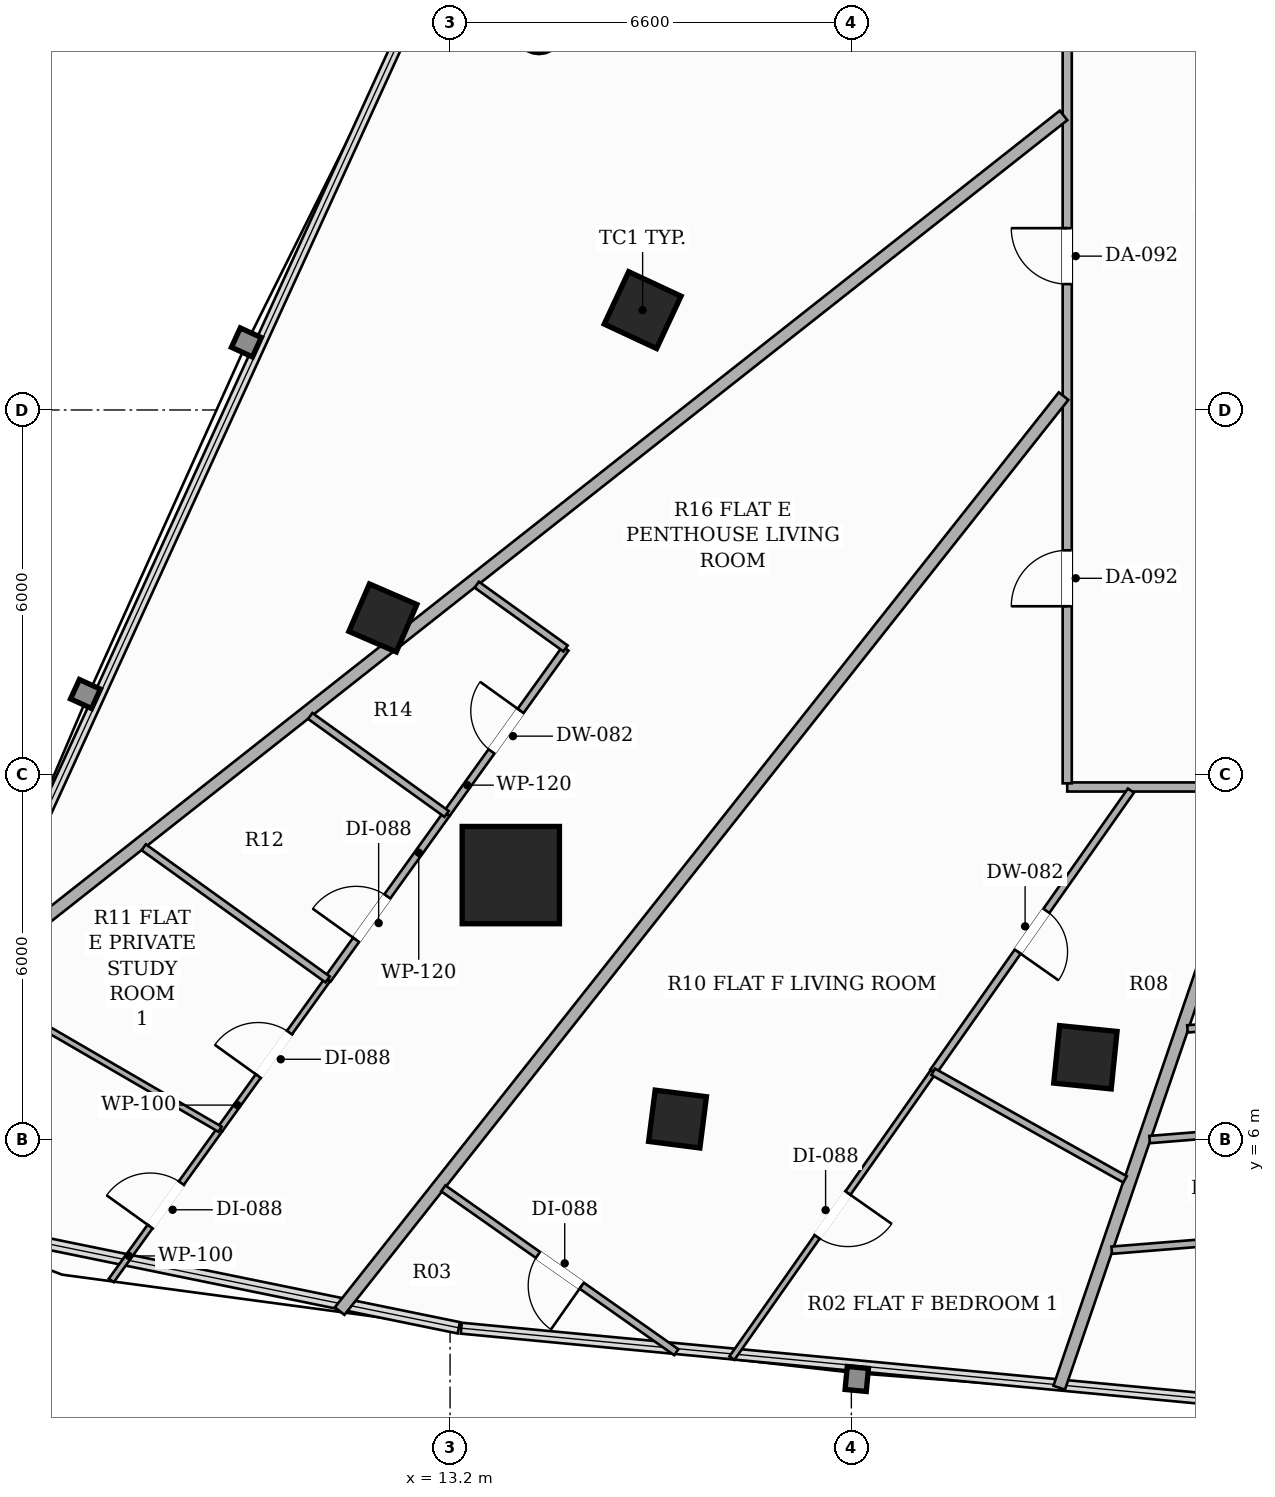
"""IFC4 building model, lengths in metres.
Left out: names, types, materials, properties, quantities, classifications, styles, units other than length and angle.
Written with IfcOpenShell. Run it as: python <this file> out.ifc"""

import sys

from ifc_helpers import new_model, si_unit, direction, frame, frame_2d, origin, origin_2d, place, context, subcontext, project, spatial, rectangle, hollow_rectangle, hollow_circle, extrude, element, fill, save


model = new_model("IFC4")
c1 = context("Model", 3, precision=1e-05, world=origin(), true_north=direction((0.0, 1.0)))
c2 = subcontext(c1, "Body", "Model", "MODEL_VIEW")
j1 = project(units=[si_unit("LENGTHUNIT", "METRE"), si_unit("PLANEANGLEUNIT", "RADIAN")], contexts=[c1])
p1 = place(None, origin())
s1 = spatial("IfcSite", under=j1, at=p1, CompositionType="ELEMENT")
p2 = place(p1, origin())
s2 = spatial("IfcBuilding", under=s1, at=p2, CompositionType="ELEMENT")
p3 = place(p2, frame((0.0, 0.0, 53.3)))
s3 = spatial("IfcBuildingStorey", under=s2, at=p3, CompositionType="ELEMENT", Elevation=53.3)
p4 = place(p3, frame((14.199, 10.351, 0.0), z_axis=(0.0, 0.0, 1.0), x_axis=(1.0, 0.0, 0.0)))
e1 = element("IfcColumn", 1, at=p4, inside=s3, PredefinedType="COLUMN", context=c2, shape_type="SweptSolid", body=[
    extrude(hollow_rectangle(XDim=1.6, YDim=1.6, WallThickness=0.05, at=origin_2d()), origin(), (0.0, 0.0, 1.0), 3.3),
])
for number, where, z_axis, x_axis in (
    (2, (16.367, 19.642, 0.0), (0.0, 0.0, 1.0), (0.423, 0.906, 0.0)),
    (3, (23.649, 7.355, 0.0), (0.0, 0.0, 1.0), (-0.995, 0.101, 0.0)),
):
    element("IfcColumn", number, at=place(p3, frame(where, z_axis=z_axis, x_axis=x_axis)), inside=s3, PredefinedType="COLUMN", context=c2, shape_type="SweptSolid", body=[
        extrude(hollow_rectangle(XDim=0.95, YDim=0.95, WallThickness=0.032, at=origin_2d()), origin(), (0.0, 0.0, 1.0), 3.3),
    ])
for number, where, z_axis, x_axis in (
    (4, (12.095, 14.58, 0.0), (0.0, 0.0, 1.0), (0.397, 0.918, 0.0)),
    (5, (16.941, 6.339, 0.0), (0.0, 0.0, 1.0), (-0.992, 0.127, 0.0)),
):
    element("IfcColumn", number, at=place(p3, frame(where, z_axis=z_axis, x_axis=x_axis)), inside=s3, PredefinedType="COLUMN", context=c2, shape_type="SweptSolid", body=[
        extrude(hollow_rectangle(XDim=0.85, YDim=0.85, WallThickness=0.028, at=origin_2d()), origin(), (0.0, 0.0, 1.0), 3.3),
    ])
p5 = place(p3, frame((14.662, 24.256, 0.0), z_axis=(0.0, 0.0, 1.0), x_axis=(1.0, 0.0, 0.0)))
e6 = element("IfcColumn", 6, at=p5, inside=s3, PredefinedType="COLUMN", context=c2, shape_type="SweptSolid", body=[
    extrude(hollow_circle(Radius=0.381, WallThickness=0.022, at=origin_2d()), origin(), (0.0, 0.0, 1.0), 3.3),
])
p6 = place(p3, frame((42.59, 11.8, 0.0), z_axis=(0.0, 0.0, 1.0), x_axis=(-1.0, 0.0, 0.0)))
e7 = element("IfcWall", 7, at=p6, inside=s3, PredefinedType="PARTITIONING", context=c2, shape_type="SweptSolid", body=[
    extrude(rectangle(XDim=19.24, YDim=0.15, at=frame_2d((9.62, 0.0))), origin(), (0.0, 0.0, 1.0), 2.669),
])
p7 = place(p6, frame((11.355, 0.0, 0.0)))
e8 = element("IfcOpeningElement", 8, at=p7, cuts=e7, PredefinedType="OPENING", context=c2, shape_type="SweptSolid", body=[
    extrude(rectangle(XDim=0.92, YDim=2.15, at=frame_2d((0.46, 1.075))), frame((0.0, 0.085, 0.0), z_axis=(0.0, -1.0, 0.0), x_axis=(1.0, 0.0, 0.0)), (0.0, 0.0, 1.0), 0.17),
])
p8 = place(p6, frame((3.524, 0.0, 0.0)))
e9 = element("IfcOpeningElement", 9, at=p8, cuts=e7, PredefinedType="OPENING", context=c2, shape_type="SweptSolid", body=[
    extrude(rectangle(XDim=0.88, YDim=2.1, at=frame_2d((0.44, 1.05))), frame((0.0, 0.085, 0.0), z_axis=(0.0, -1.0, 0.0), x_axis=(1.0, 0.0, 0.0)), (0.0, 0.0, 1.0), 0.17),
])
p9 = place(p3, frame((23.35, 11.86, 0.0), z_axis=(0.0, 0.0, 1.0), x_axis=(0.0, 1.0, 0.0)))
e10 = element("IfcWall", 10, at=p9, inside=s3, PredefinedType="PARTITIONING", context=c2, shape_type="SweptSolid", body=[
    extrude(rectangle(XDim=25.04, YDim=0.15, at=frame_2d((12.52, 0.0))), origin(), (0.0, 0.0, 1.0), 2.413),
])
p10 = place(p9, frame((15.434, 0.0, 0.0)))
e11 = element("IfcOpeningElement", 11, at=p10, cuts=e10, PredefinedType="OPENING", context=c2, shape_type="SweptSolid", body=[
    extrude(rectangle(XDim=0.88, YDim=2.1, at=frame_2d((0.44, 1.05))), frame((0.0, 0.085, 0.0), z_axis=(0.0, -1.0, 0.0), x_axis=(1.0, 0.0, 0.0)), (0.0, 0.0, 1.0), 0.17),
])
p11 = place(p9, frame((22.315, 0.0, 0.0)))
e12 = element("IfcOpeningElement", 12, at=p11, cuts=e10, PredefinedType="OPENING", context=c2, shape_type="SweptSolid", body=[
    extrude(rectangle(XDim=0.88, YDim=2.1, at=frame_2d((0.44, 1.05))), frame((0.0, 0.085, 0.0), z_axis=(0.0, -1.0, 0.0), x_axis=(1.0, 0.0, 0.0)), (0.0, 0.0, 1.0), 0.17),
])
p12 = place(p9, frame((8.21, 0.0, 0.0)))
e13 = element("IfcOpeningElement", 13, at=p12, cuts=e10, PredefinedType="OPENING", context=c2, shape_type="SweptSolid", body=[
    extrude(rectangle(XDim=0.92, YDim=2.15, at=frame_2d((0.46, 1.075))), frame((0.0, 0.085, 0.0), z_axis=(0.0, -1.0, 0.0), x_axis=(1.0, 0.0, 0.0)), (0.0, 0.0, 1.0), 0.17),
])
p13 = place(p9, frame((2.912, 0.0, 0.0)))
e14 = element("IfcOpeningElement", 14, at=p13, cuts=e10, PredefinedType="OPENING", context=c2, shape_type="SweptSolid", body=[
    extrude(rectangle(XDim=0.92, YDim=2.15, at=frame_2d((0.46, 1.075))), frame((0.0, 0.085, 0.0), z_axis=(0.0, -1.0, 0.0), x_axis=(1.0, 0.0, 0.0)), (0.0, 0.0, 1.0), 0.17),
])
p14 = place(p3, frame((23.29, 22.844, 0.0), z_axis=(0.0, 0.0, 1.0), x_axis=(-0.785302077685, -0.619112790034, 0.0)))
e15 = element("IfcWall", 15, at=p14, inside=s3, PredefinedType="PARTITIONING", context=c2, shape_type="SweptSolid", body=[
    extrude(rectangle(XDim=22.957, YDim=0.2, at=frame_2d((11.479, 0.0))), origin(), (0.0, 0.0, 1.0), 2.413),
])
p15 = place(p3, frame((23.29, 18.228, 0.0), z_axis=(0.0, 0.0, 1.0), x_axis=(-0.620501189922, -0.784205504511, 0.0)))
e16 = element("IfcWall", 16, at=p15, inside=s3, PredefinedType="PARTITIONING", context=c2, shape_type="SweptSolid", body=[
    extrude(rectangle(XDim=19.188, YDim=0.2, at=frame_2d((9.594, 0.0))), origin(), (0.0, 0.0, 1.0), 2.413),
])
p16 = place(p3, frame((26.579, 11.74, 0.0), z_axis=(0.0, 0.0, 1.0), x_axis=(-0.32385337678, -0.946107282684, 0.0)))
e17 = element("IfcWall", 17, at=p16, inside=s3, PredefinedType="PARTITIONING", context=c2, shape_type="SweptSolid", body=[
    extrude(rectangle(XDim=10.378, YDim=0.2, at=frame_2d((5.189, 0.0))), origin(), (0.0, 0.0, 1.0), 2.413),
])
p17 = place(p3, frame((13.143, 11.357, 0.0), z_axis=(0.0, 0.0, 1.0), x_axis=(0.583709603858, 0.811962498127, 0.0)))
e18 = element("IfcWall", 18, at=p17, inside=s3, PredefinedType="PARTITIONING", context=c2, shape_type="SweptSolid", body=[
    extrude(rectangle(XDim=3.351, YDim=0.12, at=frame_2d((1.676, 0.0))), origin(), (0.0, 0.0, 1.0), 2.413),
])
p18 = place(p17, frame((1.266, 0.0, 0.0)))
e19 = element("IfcOpeningElement", 19, at=p18, cuts=e18, PredefinedType="OPENING", context=c2, shape_type="SweptSolid", body=[
    extrude(rectangle(XDim=0.82, YDim=2.1, at=frame_2d((0.41, 1.05))), frame((0.0, 0.07, 0.0), z_axis=(0.0, -1.0, 0.0), x_axis=(1.0, 0.0, 0.0)), (0.0, 0.0, 1.0), 0.14),
])
p19 = place(p3, frame((15.099, 14.078, 0.0), z_axis=(0.0, 0.0, 1.0), x_axis=(-0.812134003072, 0.583470959906, 0.0)))
e20 = element("IfcWall", 20, at=p19, inside=s3, PredefinedType="PARTITIONING", context=c2, shape_type="SweptSolid", body=[
    extrude(rectangle(XDim=1.798, YDim=0.12, at=frame_2d((0.899, 0.0))), origin(), (0.0, 0.0, 1.0), 3.06),
])
p20 = place(p3, frame((11.187, 8.635, 0.0), z_axis=(0.0, 0.0, 1.0), x_axis=(0.583571510595, 0.812061753823, 0.0)))
e21 = element("IfcWall", 21, at=p20, inside=s3, PredefinedType="PARTITIONING", context=c2, shape_type="SweptSolid", body=[
    extrude(rectangle(XDim=3.352, YDim=0.12, at=frame_2d((1.676, 0.0))), origin(), (0.0, 0.0, 1.0), 2.619),
])
p21 = place(p20, frame((0.802, 0.0, 0.0)))
e22 = element("IfcOpeningElement", 22, at=p21, cuts=e21, PredefinedType="OPENING", context=c2, shape_type="SweptSolid", body=[
    extrude(rectangle(XDim=0.88, YDim=2.1, at=frame_2d((0.44, 1.05))), frame((0.0, 0.07, 0.0), z_axis=(0.0, -1.0, 0.0), x_axis=(1.0, 0.0, 0.0)), (0.0, 0.0, 1.0), 0.14),
])
p22 = place(p3, frame((7.629, 3.685, 0.0), z_axis=(0.0, 0.0, 1.0), x_axis=(0.583746077317, 0.811936276574, 0.0)))
e23 = element("IfcWall", 23, at=p22, inside=s3, PredefinedType="PARTITIONING", context=c2, shape_type="SweptSolid", body=[
    extrude(rectangle(XDim=3.063, YDim=0.1, at=frame_2d((1.532, 0.0))), origin(), (0.0, 0.0, 1.0), 3.06),
])
p23 = place(p22, frame((1.092, 0.0, 0.0)))
e24 = element("IfcOpeningElement", 24, at=p23, cuts=e23, PredefinedType="OPENING", context=c2, shape_type="SweptSolid", body=[
    extrude(rectangle(XDim=0.88, YDim=2.1, at=frame_2d((0.44, 1.05))), frame((0.0, 0.06, 0.0), z_axis=(0.0, -1.0, 0.0), x_axis=(1.0, 0.0, 0.0)), (0.0, 0.0, 1.0), 0.12),
])
p24 = place(p3, frame((9.417, 6.172, 0.0), z_axis=(0.0, 0.0, 1.0), x_axis=(0.583596240012, 0.812043981964, 0.0)))
e25 = element("IfcWall", 25, at=p24, inside=s3, PredefinedType="PARTITIONING", context=c2, shape_type="SweptSolid", body=[
    extrude(rectangle(XDim=3.033, YDim=0.1, at=frame_2d((1.517, 0.0))), origin(), (0.0, 0.0, 1.0), 2.619),
])
p25 = place(p24, frame((1.077, 0.0, 0.0)))
e26 = element("IfcOpeningElement", 26, at=p25, cuts=e25, PredefinedType="OPENING", context=c2, shape_type="SweptSolid", body=[
    extrude(rectangle(XDim=0.88, YDim=2.1, at=frame_2d((0.44, 1.05))), frame((0.0, 0.06, 0.0), z_axis=(0.0, -1.0, 0.0), x_axis=(1.0, 0.0, 0.0)), (0.0, 0.0, 1.0), 0.12),
])
p26 = place(p3, frame((13.143, 11.357, 0.0), z_axis=(0.0, 0.0, 1.0), x_axis=(-0.812099176387, 0.583519432162, 0.0)))
e27 = element("IfcWall", 27, at=p26, inside=s3, PredefinedType="PARTITIONING", context=c2, shape_type="SweptSolid", body=[
    extrude(rectangle(XDim=2.761, YDim=0.12, at=frame_2d((1.38, 0.0))), origin(), (0.0, 0.0, 1.0), 3.06),
])
p27 = place(p3, frame((11.187, 8.635, 0.0), z_axis=(0.0, 0.0, 1.0), x_axis=(-0.812025077548, 0.583622543629, 0.0)))
e28 = element("IfcWall", 28, at=p27, inside=s3, PredefinedType="PARTITIONING", context=c2, shape_type="SweptSolid", body=[
    extrude(rectangle(XDim=3.725, YDim=0.12, at=frame_2d((1.863, 0.0))), origin(), (0.0, 0.0, 1.0), 2.619),
])
p28 = place(p3, frame((5.253, 8.59, 0.0), z_axis=(0.0, 0.0, 1.0), x_axis=(0.864777582771, -0.502155087932, 0.0)))
e29 = element("IfcWall", 29, at=p28, inside=s3, PredefinedType="PARTITIONING", context=c2, shape_type="SweptSolid", body=[
    extrude(rectangle(XDim=4.815, YDim=0.1, at=frame_2d((2.408, 0.0))), origin(), (0.0, 0.0, 1.0), 3.06),
])
p29 = place(p3, frame((24.398, 11.74, 0.0), z_axis=(0.0, 0.0, 1.0), x_axis=(-0.575258030062, -0.817972003707, 0.0)))
e30 = element("IfcWall", 30, at=p29, inside=s3, PredefinedType="PARTITIONING", context=c2, shape_type="SweptSolid", body=[
    extrude(rectangle(XDim=5.653, YDim=0.12, at=frame_2d((2.827, 0.0))), origin(), (0.0, 0.0, 1.0), 2.413),
])
p30 = place(p29, frame((2.417, 0.0, 0.0)))
e31 = element("IfcOpeningElement", 31, at=p30, cuts=e30, PredefinedType="OPENING", context=c2, shape_type="SweptSolid", body=[
    extrude(rectangle(XDim=0.82, YDim=2.1, at=frame_2d((0.41, 1.05))), frame((0.0, 0.07, 0.0), z_axis=(0.0, -1.0, 0.0), x_axis=(1.0, 0.0, 0.0)), (0.0, 0.0, 1.0), 0.14),
])
p31 = place(p3, frame((16.921, 2.505, 0.0), z_axis=(0.0, 0.0, 1.0), x_axis=(-0.818042569522, 0.575157677902, 0.0)))
e32 = element("IfcWall", 32, at=p31, inside=s3, PredefinedType="PARTITIONING", context=c2, shape_type="SweptSolid", body=[
    extrude(rectangle(XDim=4.684, YDim=0.12, at=frame_2d((2.342, 0.0))), origin(), (0.0, 0.0, 1.0), 2.619),
])
p32 = place(p31, frame((1.902, 0.0, 0.0)))
e33 = element("IfcOpeningElement", 33, at=p32, cuts=e32, PredefinedType="OPENING", context=c2, shape_type="SweptSolid", body=[
    extrude(rectangle(XDim=0.88, YDim=2.1, at=frame_2d((0.44, 1.05))), frame((0.0, 0.07, 0.0), z_axis=(0.0, -1.0, 0.0), x_axis=(1.0, 0.0, 0.0)), (0.0, 0.0, 1.0), 0.14),
])
p33 = place(p3, frame((21.146, 7.116, 0.0), z_axis=(0.0, 0.0, 1.0), x_axis=(-0.575180299529, -0.818026664011, 0.0)))
e34 = element("IfcWall", 34, at=p33, inside=s3, PredefinedType="PARTITIONING", context=c2, shape_type="SweptSolid", body=[
    extrude(rectangle(XDim=5.757, YDim=0.1, at=frame_2d((2.878, 0.0))), origin(), (0.0, 0.0, 1.0), 2.413),
])
p34 = place(p33, frame((2.438, 0.0, 0.0)))
e35 = element("IfcOpeningElement", 35, at=p34, cuts=e34, PredefinedType="OPENING", context=c2, shape_type="SweptSolid", body=[
    extrude(rectangle(XDim=0.88, YDim=2.1, at=frame_2d((0.44, 1.05))), frame((0.0, 0.06, 0.0), z_axis=(0.0, -1.0, 0.0), x_axis=(1.0, 0.0, 0.0)), (0.0, 0.0, 1.0), 0.12),
])
p35 = place(p3, frame((24.301, 5.347, 0.0), z_axis=(0.0, 0.0, 1.0), x_axis=(-0.872243471816, 0.48907190256, 0.0)))
e36 = element("IfcWall", 36, at=p35, inside=s3, PredefinedType="PARTITIONING", context=c2, shape_type="SweptSolid", body=[
    extrude(rectangle(XDim=3.617, YDim=0.12, at=frame_2d((1.809, 0.0))), origin(), (0.0, 0.0, 1.0), 2.413),
])
p36 = place(p3, frame((27.909, 8.03, 0.0), z_axis=(0.0, 0.0, 1.0), x_axis=(-0.996768339954, -0.080329798112, 0.0)))
e37 = element("IfcWall", 37, at=p36, inside=s3, PredefinedType="PARTITIONING", context=c2, shape_type="SweptSolid", body=[
    extrude(rectangle(XDim=2.589, YDim=0.12, at=frame_2d((1.295, 0.0))), origin(), (0.0, 0.0, 1.0), 3.06),
])
p37 = place(p36, frame((0.885, 0.0, 0.0)))
e38 = element("IfcOpeningElement", 38, at=p37, cuts=e37, PredefinedType="OPENING", context=c2, shape_type="SweptSolid", body=[
    extrude(rectangle(XDim=0.82, YDim=2.1, at=frame_2d((0.41, 1.05))), frame((0.0, 0.07, 0.0), z_axis=(0.0, -1.0, 0.0), x_axis=(1.0, 0.0, 0.0)), (0.0, 0.0, 1.0), 0.14),
])
p38 = place(p3, frame((28.05, 6.272, 0.0), z_axis=(0.0, 0.0, 1.0), x_axis=(-0.99675765278, -0.080462299392, 0.0)))
e39 = element("IfcWall", 39, at=p38, inside=s3, PredefinedType="PARTITIONING", context=c2, shape_type="SweptSolid", body=[
    extrude(rectangle(XDim=3.356, YDim=0.12, at=frame_2d((1.678, 0.0))), origin(), (0.0, 0.0, 1.0), 2.413),
])
p39 = place(p3, frame((28.192, 4.513, 0.0), z_axis=(0.0, 0.0, 1.0), x_axis=(-0.996771449714, -0.080291201486, 0.0)))
e40 = element("IfcWall", 40, at=p39, inside=s3, PredefinedType="PARTITIONING", context=c2, shape_type="SweptSolid", body=[
    extrude(rectangle(XDim=4.123, YDim=0.12, at=frame_2d((2.062, 0.0))), origin(), (0.0, 0.0, 1.0), 2.413),
])
p40 = place(p12, origin())
e41 = element("IfcDoor", 41, at=p40, inside=s3, OperationType="SINGLE_SWING_RIGHT", PredefinedType="DOOR", context=c2, shape_type="SweptSolid", body=[
    extrude(rectangle(XDim=0.92, YDim=2.15, at=frame_2d((0.46, 1.075))), frame((0.0, 0.025, 0.0), z_axis=(0.0, -1.0, 0.0), x_axis=(1.0, 0.0, 0.0)), (0.0, 0.0, 1.0), 0.05),
])
fill(e13, e41)
p41 = place(p18, origin())
e42 = element("IfcDoor", 42, at=p41, inside=s3, OperationType="SINGLE_SWING_RIGHT", PredefinedType="DOOR", context=c2, shape_type="SweptSolid", body=[
    extrude(rectangle(XDim=0.82, YDim=2.1, at=frame_2d((0.41, 1.05))), frame((0.0, 0.025, 0.0), z_axis=(0.0, -1.0, 0.0), x_axis=(1.0, 0.0, 0.0)), (0.0, 0.0, 1.0), 0.05),
])
fill(e19, e42)
p42 = place(p21, origin())
e43 = element("IfcDoor", 43, at=p42, inside=s3, OperationType="SINGLE_SWING_LEFT", PredefinedType="DOOR", context=c2, shape_type="SweptSolid", body=[
    extrude(rectangle(XDim=0.88, YDim=2.1, at=frame_2d((0.44, 1.05))), frame((0.0, 0.025, 0.0), z_axis=(0.0, -1.0, 0.0), x_axis=(1.0, 0.0, 0.0)), (0.0, 0.0, 1.0), 0.05),
])
fill(e22, e43)
p43 = place(p23, origin())
e44 = element("IfcDoor", 44, at=p43, inside=s3, OperationType="SINGLE_SWING_LEFT", PredefinedType="DOOR", context=c2, shape_type="SweptSolid", body=[
    extrude(rectangle(XDim=0.88, YDim=2.1, at=frame_2d((0.44, 1.05))), frame((0.0, 0.025, 0.0), z_axis=(0.0, -1.0, 0.0), x_axis=(1.0, 0.0, 0.0)), (0.0, 0.0, 1.0), 0.05),
])
fill(e24, e44)
p44 = place(p25, origin())
e45 = element("IfcDoor", 45, at=p44, inside=s3, OperationType="SINGLE_SWING_LEFT", PredefinedType="DOOR", context=c2, shape_type="SweptSolid", body=[
    extrude(rectangle(XDim=0.88, YDim=2.1, at=frame_2d((0.44, 1.05))), frame((0.0, 0.025, 0.0), z_axis=(0.0, -1.0, 0.0), x_axis=(1.0, 0.0, 0.0)), (0.0, 0.0, 1.0), 0.05),
])
fill(e26, e45)
p45 = place(p13, origin())
e46 = element("IfcDoor", 46, at=p45, inside=s3, OperationType="SINGLE_SWING_LEFT", PredefinedType="DOOR", context=c2, shape_type="SweptSolid", body=[
    extrude(rectangle(XDim=0.92, YDim=2.15, at=frame_2d((0.46, 1.075))), frame((0.0, 0.025, 0.0), z_axis=(0.0, -1.0, 0.0), x_axis=(1.0, 0.0, 0.0)), (0.0, 0.0, 1.0), 0.05),
])
fill(e14, e46)
p46 = place(p30, origin())
e47 = element("IfcDoor", 47, at=p46, inside=s3, OperationType="SINGLE_SWING_RIGHT", PredefinedType="DOOR", context=c2, shape_type="SweptSolid", body=[
    extrude(rectangle(XDim=0.82, YDim=2.1, at=frame_2d((0.41, 1.05))), frame((0.0, 0.025, 0.0), z_axis=(0.0, -1.0, 0.0), x_axis=(1.0, 0.0, 0.0)), (0.0, 0.0, 1.0), 0.05),
])
fill(e31, e47)
p47 = place(p32, origin())
e48 = element("IfcDoor", 48, at=p47, inside=s3, OperationType="SINGLE_SWING_LEFT", PredefinedType="DOOR", context=c2, shape_type="SweptSolid", body=[
    extrude(rectangle(XDim=0.88, YDim=2.1, at=frame_2d((0.44, 1.05))), frame((0.0, 0.025, 0.0), z_axis=(0.0, -1.0, 0.0), x_axis=(1.0, 0.0, 0.0)), (0.0, 0.0, 1.0), 0.05),
])
fill(e33, e48)
p48 = place(p34, origin())
e49 = element("IfcDoor", 49, at=p48, inside=s3, OperationType="SINGLE_SWING_LEFT", PredefinedType="DOOR", context=c2, shape_type="SweptSolid", body=[
    extrude(rectangle(XDim=0.88, YDim=2.1, at=frame_2d((0.44, 1.05))), frame((0.0, 0.025, 0.0), z_axis=(0.0, -1.0, 0.0), x_axis=(1.0, 0.0, 0.0)), (0.0, 0.0, 1.0), 0.05),
])
fill(e35, e49)
save(model, sys.argv[1])
